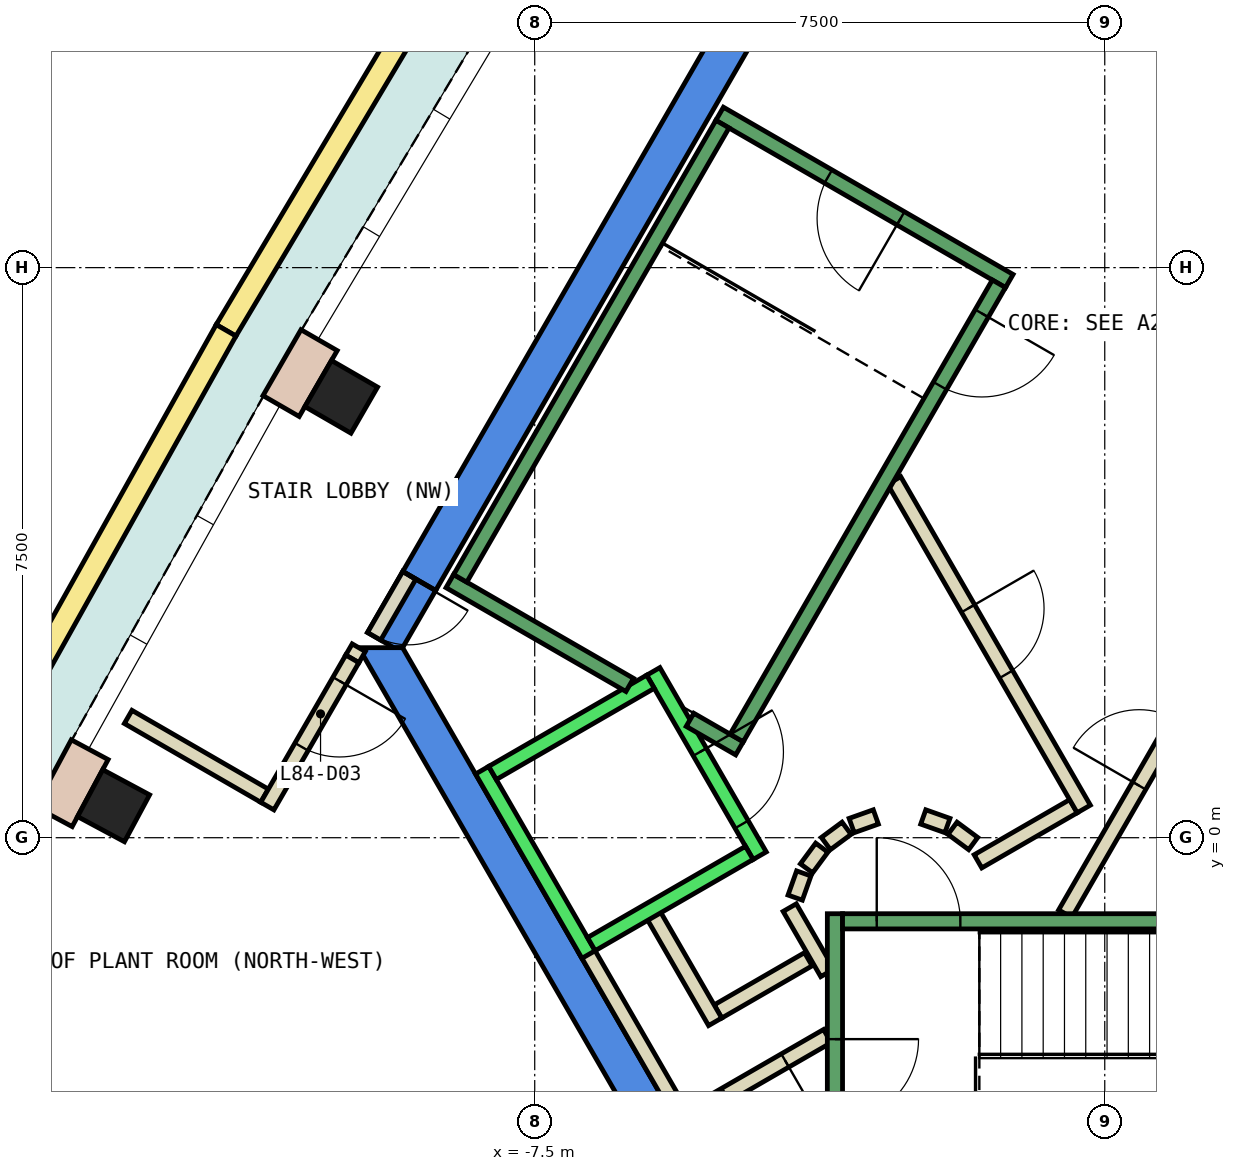
"""IFC4 building model, lengths in metres.
Left out: names, types, materials, properties, quantities, classifications, styles, units other than length and angle.
Written with IfcOpenShell. Run it as: python <this file> out.ifc"""

import sys

from ifc_helpers import new_model, si_unit, direction, frame, frame_2d, origin, origin_2d, place, context, subcontext, project, spatial, polyline, rectangle, outline, extrude, element, fill, save


model = new_model("IFC4")
c1 = context("Model", 3, precision=1e-05, world=origin(), true_north=direction((0.0, 1.0)))
c2 = subcontext(c1, "Body", "Model", "MODEL_VIEW")
j1 = project(units=[si_unit("LENGTHUNIT", "METRE"), si_unit("PLANEANGLEUNIT", "RADIAN")], contexts=[c1])
p1 = place(None, origin())
s1 = spatial("IfcSite", under=j1, at=p1, CompositionType="ELEMENT")
p2 = place(p1, origin())
s2 = spatial("IfcBuilding", under=s1, at=p2, CompositionType="ELEMENT")
p3 = place(p2, frame((0.0, 0.0, 358.4)))
s3 = spatial("IfcBuildingStorey", under=s2, at=p3, CompositionType="ELEMENT", Elevation=358.4)
for number, where, z_axis, x_axis in (
    (1, (-10.046, 5.8, 0.0), (0.0, 0.0, 1.0), (0.5, 0.866, 0.0)),
    (2, (-13.041, 0.421, 0.0), (0.0, 0.0, 1.0), (0.473, 0.881, 0.0)),
):
    element("IfcColumn", number, at=place(p3, frame(where, z_axis=z_axis, x_axis=x_axis)), inside=s3, PredefinedType="COLUMN", context=c2, shape_type="SweptSolid", body=[
        extrude(rectangle(XDim=0.7, YDim=0.7, at=origin_2d()), origin(), (0.0, 0.0, 1.0), 4.05),
    ])
p4 = place(p3, frame((0.0, 0.0, -0.45)))
e3 = element("IfcWall", 3, at=p4, inside=s3, PredefinedType="SHEAR", context=c2, shape_type="SweptSolid", body=[
    extrude(outline(polyline([(-9.236, 3.502), (-8.803, 3.253), (-4.619, 10.5), (-4.907, 11.0), (-9.236, 3.502)])), origin(), (0.0, 0.0, 1.0), 4.5),
])
p5 = place(p3, frame((0.0, 0.0, 3.6)))
e4 = element("IfcWall", 4, at=p5, inside=s3, PredefinedType="SHEAR", context=c2, shape_type="SweptSolid", body=[
    extrude(outline(polyline([(-9.7, 2.7), (-9.354, 2.5), (-9.238, 2.5), (-8.803, 3.253), (-9.236, 3.502), (-9.7, 2.7)])), origin(), (0.0, 0.0, 1.0), 0.45),
])
p6 = place(p3, frame((0.0, 0.0, -0.45)))
e5 = element("IfcWall", 5, at=p6, inside=s3, PredefinedType="SHEAR", context=c2, shape_type="SweptSolid", body=[
    extrude(outline(polyline([(-9.815, 2.5), (-4.907, -6.0), (-4.619, -5.5), (-9.238, 2.5), (-9.815, 2.5)])), origin(), (0.0, 0.0, 1.0), 4.5),
])
for number, where, z_axis, x_axis in (
    (6, (-10.337, 6.546, 0.0), (0.0, 0.0, 1.0), (-0.5, -0.866, 0.0)),
    (7, (-13.355, 1.158, 0.0), (0.0, 0.0, 1.0), (-0.472, -0.881, 0.0)),
):
    element("IfcWall", number, at=place(p3, frame(where, z_axis=z_axis, x_axis=x_axis)), inside=s3, PredefinedType="STANDARD", context=c2, shape_type="SweptSolid", body=[
        extrude(rectangle(XDim=1.001, YDim=0.55, at=frame_2d((0.5, 0.0))), origin(), (0.0, 0.0, 1.0), 4.05),
    ])
p7 = place(p3, origin())
e8 = element("IfcWall", 8, at=p7, inside=s3, PredefinedType="PARAPET", context=c2, shape_type="SweptSolid", body=[
    extrude(outline(polyline([(-8.278, 12.473), (-11.691, 6.75), (-11.431, 6.6), (-8.023, 12.316), (-8.278, 12.473)])), origin(), (0.0, 0.0, 1.0), 1.1),
])
p8 = place(p3, origin())
e9 = element("IfcWall", 9, at=p8, inside=s3, PredefinedType="PARAPET", context=c2, shape_type="SweptSolid", body=[
    extrude(outline(polyline([(-11.691, 6.75), (-14.941, 0.933), (-14.677, 0.79), (-11.431, 6.6), (-11.691, 6.75)])), origin(), (0.0, 0.0, 1.0), 1.1),
])
p9 = place(p3, frame((-3.9, -1.599, 0.0), z_axis=(0.0, 0.0, 1.0), x_axis=(-0.865969445389, -0.500096910261, 0.0)))
e10 = element("IfcWall", 10, at=p9, inside=s3, PredefinedType="PARTITIONING", context=c2, shape_type="SweptSolid", body=[
    extrude(rectangle(XDim=1.373, YDim=0.2, at=frame_2d((0.687, 0.0))), origin(), (0.0, 0.0, 1.0), 4.05),
])
p10 = place(p3, frame((-5.126, -2.422, 0.0), z_axis=(0.0, 0.0, 1.0), x_axis=(-0.500062241894, 0.865989465428, 0.0)))
e11 = element("IfcWall", 11, at=p10, inside=s3, PredefinedType="PARTITIONING", context=c2, shape_type="SweptSolid", body=[
    extrude(rectangle(XDim=1.7, YDim=0.2, at=frame_2d((0.85, 0.0))), origin(), (0.0, 0.0, 1.0), 4.05),
])
p11 = place(p3, frame((-5.492, -3.788, 0.0), z_axis=(0.0, 0.0, 1.0), x_axis=(-0.500008949224, 0.866020236886, 0.0)))
e12 = element("IfcWall", 12, at=p11, inside=s3, PredefinedType="PARTITIONING", context=c2, shape_type="SweptSolid", body=[
    extrude(rectangle(XDim=2.68, YDim=0.2, at=frame_2d((1.34, 0.0))), origin(), (0.0, 0.0, 1.0), 4.05),
])
p12 = place(p3, frame((-4.145, -0.92, 0.0), z_axis=(0.0, 0.0, 1.0), x_axis=(0.499743786207, -0.866173278362, 0.0)))
e13 = element("IfcWall", 13, at=p12, inside=s3, PredefinedType="PARTITIONING", context=c2, shape_type="SweptSolid", body=[
    extrude(rectangle(XDim=0.991, YDim=0.2, at=frame_2d((0.495, 0.0))), origin(), (0.0, 0.0, 1.0), 4.05),
])
p13 = place(p3, frame((-3.65, -2.61, 0.0), z_axis=(0.0, 0.0, 1.0), x_axis=(-0.866072462134, -0.499918483688, 0.0)))
e14 = element("IfcWall", 14, at=p13, inside=s3, PredefinedType="PARTITIONING", context=c2, shape_type="SweptSolid", body=[
    extrude(rectangle(XDim=2.084, YDim=0.2, at=frame_2d((1.042, 0.0))), origin(), (0.0, 0.0, 1.0), 4.05),
])
p14 = place(p13, frame((0.642, 0.0, 0.0)))
e15 = element("IfcOpeningElement", 15, at=p14, cuts=e14, PredefinedType="OPENING", context=c2, shape_type="SweptSolid", body=[
    extrude(rectangle(XDim=0.9, YDim=2.1, at=frame_2d((0.45, 1.05))), frame((0.0, 0.11, 0.0), z_axis=(0.0, -1.0, 0.0), x_axis=(1.0, 0.0, 0.0)), (0.0, 0.0, 1.0), 0.22),
])
p15 = place(p3, frame((-0.52, -1.0, 0.0), z_axis=(0.0, 0.0, 1.0), x_axis=(0.50011622646, 0.865958290007, 0.0)))
e16 = element("IfcWall", 16, at=p15, inside=s3, PredefinedType="PARTITIONING", context=c2, shape_type="SweptSolid", body=[
    extrude(rectangle(XDim=4.991, YDim=0.2, at=frame_2d((2.496, 0.0))), origin(), (0.0, 0.0, 1.0), 4.05),
])
p16 = place(p15, frame((1.945, 0.0, 0.0)))
e17 = element("IfcOpeningElement", 17, at=p16, cuts=e16, PredefinedType="OPENING", context=c2, shape_type="SweptSolid", body=[
    extrude(rectangle(XDim=1.0, YDim=2.1, at=frame_2d((0.5, 1.05))), frame((0.0, 0.11, 0.0), z_axis=(0.0, -1.0, 0.0), x_axis=(1.0, 0.0, 0.0)), (0.0, 0.0, 1.0), 0.22),
])
p17 = place(p3, frame((-0.412, 0.414, 0.0), z_axis=(0.0, 0.0, 1.0), x_axis=(-0.866017369001, -0.500013916395, 0.0)))
e18 = element("IfcWall", 18, at=p17, inside=s3, PredefinedType="PARTITIONING", context=c2, shape_type="SweptSolid", body=[
    extrude(rectangle(XDim=1.45, YDim=0.2, at=frame_2d((0.725, 0.0))), origin(), (0.0, 0.0, 1.0), 4.05),
])
p18 = place(p3, frame((-1.731, -0.077, 0.0), z_axis=(0.0, 0.0, 1.0), x_axis=(-0.804311165252, 0.594208338422, 0.0)))
e19 = element("IfcWall", 19, at=p18, inside=s3, PredefinedType="PARTITIONING", context=c2, shape_type="SweptSolid", body=[
    extrude(rectangle(XDim=0.338, YDim=0.2, at=frame_2d((0.169, 0.0))), origin(), (0.0, 0.0, 1.0), 4.05),
])
p19 = place(p3, frame((-2.07, 0.16, 0.0), z_axis=(0.0, 0.0, 1.0), x_axis=(-0.942199461132, 0.335052496547, 0.0)))
e20 = element("IfcWall", 20, at=p19, inside=s3, PredefinedType="PARTITIONING", context=c2, shape_type="SweptSolid", body=[
    extrude(rectangle(XDim=0.337, YDim=0.2, at=frame_2d((0.169, 0.0))), origin(), (0.0, 0.0, 1.0), 4.05),
])
p20 = place(p3, frame((-3.012, 0.273, 0.0), z_axis=(0.0, 0.0, 1.0), x_axis=(-0.942280615813, -0.334824194261, 0.0)))
e21 = element("IfcWall", 21, at=p20, inside=s3, PredefinedType="PARTITIONING", context=c2, shape_type="SweptSolid", body=[
    extrude(rectangle(XDim=0.338, YDim=0.2, at=frame_2d((0.169, 0.0))), origin(), (0.0, 0.0, 1.0), 4.05),
])
p21 = place(p3, frame((-3.397, 0.124, 0.0), z_axis=(0.0, 0.0, 1.0), x_axis=(-0.804311165252, -0.594208338422, 0.0)))
e22 = element("IfcWall", 22, at=p21, inside=s3, PredefinedType="PARTITIONING", context=c2, shape_type="SweptSolid", body=[
    extrude(rectangle(XDim=0.338, YDim=0.2, at=frame_2d((0.169, 0.0))), origin(), (0.0, 0.0, 1.0), 4.05),
])
p22 = place(p3, frame((-3.723, -0.131, 0.0), z_axis=(0.0, 0.0, 1.0), x_axis=(-0.594675113454, -0.803966112121, 0.0)))
e23 = element("IfcWall", 23, at=p22, inside=s3, PredefinedType="PARTITIONING", context=c2, shape_type="SweptSolid", body=[
    extrude(rectangle(XDim=0.338, YDim=0.2, at=frame_2d((0.169, 0.0))), origin(), (0.0, 0.0, 1.0), 4.05),
])
p23 = place(p3, frame((-3.96, -0.47, 0.0), z_axis=(0.0, 0.0, 1.0), x_axis=(-0.334824194261, -0.942280615813, 0.0)))
e24 = element("IfcWall", 24, at=p23, inside=s3, PredefinedType="PARTITIONING", context=c2, shape_type="SweptSolid", body=[
    extrude(rectangle(XDim=0.338, YDim=0.2, at=frame_2d((0.169, 0.0))), origin(), (0.0, 0.0, 1.0), 4.05),
])
p24 = place(p3, frame((-2.771, 4.7, 0.0), z_axis=(0.0, 0.0, 1.0), x_axis=(0.499969479948, -0.866043023828, 0.0)))
e25 = element("IfcWall", 25, at=p24, inside=s3, PredefinedType="PARTITIONING", context=c2, shape_type="SweptSolid", body=[
    extrude(rectangle(XDim=4.99, YDim=0.2, at=frame_2d((2.495, 0.0))), origin(), (0.0, 0.0, 1.0), 4.05),
])
p25 = place(p24, frame((1.945, 0.0, 0.0)))
e26 = element("IfcOpeningElement", 26, at=p25, cuts=e25, PredefinedType="OPENING", context=c2, shape_type="SweptSolid", body=[
    extrude(rectangle(XDim=1.0, YDim=2.1, at=frame_2d((0.5, 1.05))), frame((0.0, 0.11, 0.0), z_axis=(0.0, -1.0, 0.0), x_axis=(1.0, 0.0, 0.0)), (0.0, 0.0, 1.0), 0.22),
])
p26 = place(p3, frame((-11.055, 0.553, 0.0), z_axis=(0.0, 0.0, 1.0), x_axis=(-0.865971676864, 0.500093046212, 0.0)))
e27 = element("IfcWall", 27, at=p26, inside=s3, PredefinedType="PARTITIONING", context=c2, shape_type="SweptSolid", body=[
    extrude(rectangle(XDim=2.072, YDim=0.2, at=frame_2d((1.036, 0.0))), origin(), (0.0, 0.0, 1.0), 4.05),
])
p27 = place(p3, frame((-9.815, 2.5, 0.0), z_axis=(0.0, 0.0, 1.0), x_axis=(-0.5004692653, -0.865754303766, 0.0)))
e28 = element("IfcWall", 28, at=p27, inside=s3, PredefinedType="PARTITIONING", context=c2, shape_type="SweptSolid", body=[
    extrude(rectangle(XDim=0.17, YDim=0.2, at=frame_2d((0.085, 0.0))), origin(), (0.0, 0.0, 1.0), 2.4),
])
p28 = place(p3, frame((-9.15, 3.452, 0.0), z_axis=(0.0, 0.0, 1.0), x_axis=(-0.500079945886, -0.865979242085, 0.0)))
e29 = element("IfcWall", 29, at=p28, inside=s3, PredefinedType="PARTITIONING", context=c2, shape_type="SweptSolid", body=[
    extrude(rectangle(XDim=0.926, YDim=0.2, at=frame_2d((0.463, 0.0))), origin(), (0.0, 0.0, 1.0), 2.4),
])
p29 = place(p28, frame((0.017, 0.0, 0.0)))
e30 = element("IfcOpeningElement", 30, at=p29, cuts=e29, PredefinedType="OPENING", context=c2, shape_type="SweptSolid", body=[
    extrude(rectangle(XDim=0.9, YDim=2.1, at=frame_2d((0.45, 1.05))), frame((0.0, 0.11, 0.0), z_axis=(0.0, -1.0, 0.0), x_axis=(1.0, 0.0, 0.0)), (0.0, 0.0, 1.0), 0.22),
])
p30 = place(p3, frame((-9.9, 2.353, 0.0), z_axis=(0.0, 0.0, 1.0), x_axis=(-0.499942933724, -0.866058348508, 0.0)))
e31 = element("IfcWall", 31, at=p30, inside=s3, PredefinedType="PARTITIONING", context=c2, shape_type="SweptSolid", body=[
    extrude(rectangle(XDim=2.237, YDim=0.2, at=frame_2d((1.118, 0.0))), origin(), (0.0, 0.0, 1.0), 4.05),
])
p31 = place(p30, frame((0.336, 0.0, 0.0)))
e32 = element("IfcOpeningElement", 32, at=p31, cuts=e31, PredefinedType="OPENING", context=c2, shape_type="SweptSolid", body=[
    extrude(rectangle(XDim=1.0, YDim=2.1, at=frame_2d((0.5, 1.05))), frame((0.0, 0.11, 0.0), z_axis=(0.0, -1.0, 0.0), x_axis=(1.0, 0.0, 0.0)), (0.0, 0.0, 1.0), 0.22),
])
p32 = place(p3, frame((-5.94, 2.188, 0.0), z_axis=(0.0, 0.0, 1.0), x_axis=(0.49994636267, -0.866056369097, 0.0)))
e33 = element("IfcWall", 33, at=p32, inside=s3, PredefinedType="STANDARD", context=c2, shape_type="SweptSolid", body=[
    extrude(rectangle(XDim=2.8, YDim=0.2, at=frame_2d((1.4, 0.0))), origin(), (0.0, 0.0, 1.0), 4.05),
])
p33 = place(p32, frame((1.225, 0.0, 0.0)))
e34 = element("IfcOpeningElement", 34, at=p33, cuts=e33, PredefinedType="OPENING", context=c2, shape_type="SweptSolid", body=[
    extrude(rectangle(XDim=1.1, YDim=2.1, at=frame_2d((0.55, 1.05))), frame((0.0, 0.11, 0.0), z_axis=(0.0, -1.0, 0.0), x_axis=(1.0, 0.0, 0.0)), (0.0, 0.0, 1.0), 0.22),
])
p34 = place(p3, frame((-8.192, 0.888, 0.0), z_axis=(0.0, 0.0, 1.0), x_axis=(0.49994636267, -0.866056369097, 0.0)))
e35 = element("IfcWall", 35, at=p34, inside=s3, PredefinedType="STANDARD", context=c2, shape_type="SweptSolid", body=[
    extrude(rectangle(XDim=2.8, YDim=0.2, at=frame_2d((1.4, 0.0))), origin(), (0.0, 0.0, 1.0), 4.05),
])
for number, where, z_axis, x_axis in (
    (36, (-5.977, 2.052, 0.0), (0.0, 0.0, 1.0), (-0.866, -0.5, 0.0)),
    (37, (-4.677, -0.2, 0.0), (0.0, 0.0, 1.0), (-0.866, -0.5, 0.0)),
):
    element("IfcWall", number, at=place(p3, frame(where, z_axis=z_axis, x_axis=x_axis)), inside=s3, PredefinedType="STANDARD", context=c2, shape_type="SweptSolid", body=[
        extrude(rectangle(XDim=2.399, YDim=0.2, at=frame_2d((1.2, 0.0))), origin(), (0.0, 0.0, 1.0), 4.05),
    ])
p35 = place(p3, frame((-3.55, -1.0, 0.0), z_axis=(0.0, 0.0, 1.0), x_axis=(0.0, -1.0, 0.0)))
e38 = element("IfcWall", 38, at=p35, inside=s3, PredefinedType="STANDARD", context=c2, shape_type="SweptSolid", body=[
    extrude(rectangle(XDim=4.4, YDim=0.2, at=frame_2d((2.2, 0.0))), origin(), (0.0, 0.0, 1.0), 4.05),
])
p36 = place(p35, frame((1.65, 0.0, 0.0)))
e39 = element("IfcOpeningElement", 39, at=p36, cuts=e38, PredefinedType="OPENING", context=c2, shape_type="SweptSolid", body=[
    extrude(rectangle(XDim=1.1, YDim=2.2, at=frame_2d((0.55, 1.1))), frame((0.0, 0.11, 0.0), z_axis=(0.0, -1.0, 0.0), x_axis=(1.0, 0.0, 0.0)), (0.0, 0.0, 1.0), 0.22),
])
p37 = place(p3, frame((-3.45, -1.1, 0.0), z_axis=(0.0, 0.0, 1.0), x_axis=(1.0, 0.0, 0.0)))
e40 = element("IfcWall", 40, at=p37, inside=s3, PredefinedType="STANDARD", context=c2, shape_type="SweptSolid", body=[
    extrude(rectangle(XDim=6.9, YDim=0.2, at=frame_2d((3.45, 0.0))), origin(), (0.0, 0.0, 1.0), 4.05),
])
p38 = place(p37, frame((0.45, 0.0, 0.0)))
e41 = element("IfcOpeningElement", 41, at=p38, cuts=e40, PredefinedType="OPENING", context=c2, shape_type="SweptSolid", body=[
    extrude(rectangle(XDim=1.1, YDim=2.2, at=frame_2d((0.55, 1.1))), frame((0.0, 0.11, 0.0), z_axis=(0.0, -1.0, 0.0), x_axis=(1.0, 0.0, 0.0)), (0.0, 0.0, 1.0), 0.22),
])
p39 = place(p3, frame((-1.256, 7.324, 0.0), z_axis=(0.0, 0.0, 1.0), x_axis=(-0.866046073146, 0.499964197906, 0.0)))
e42 = element("IfcWall", 42, at=p39, inside=s3, PredefinedType="STANDARD", context=c2, shape_type="SweptSolid", body=[
    extrude(rectangle(XDim=4.4, YDim=0.2, at=frame_2d((2.2, 0.0))), origin(), (0.0, 0.0, 1.0), 4.05),
])
p40 = place(p39, frame((1.65, 0.0, 0.0)))
e43 = element("IfcOpeningElement", 43, at=p40, cuts=e42, PredefinedType="OPENING", context=c2, shape_type="SweptSolid", body=[
    extrude(rectangle(XDim=1.1, YDim=2.2, at=frame_2d((0.55, 1.1))), frame((0.0, 0.11, 0.0), z_axis=(0.0, -1.0, 0.0), x_axis=(1.0, 0.0, 0.0)), (0.0, 0.0, 1.0), 0.22),
])
p41 = place(p3, frame((-6.25, 2.01, 0.0), z_axis=(0.0, 0.0, 1.0), x_axis=(-0.86611865017, 0.499838457731, 0.0)))
e44 = element("IfcWall", 44, at=p41, inside=s3, PredefinedType="STANDARD", context=c2, shape_type="SweptSolid", body=[
    extrude(rectangle(XDim=2.733, YDim=0.2, at=frame_2d((1.366, 0.0))), origin(), (0.0, 0.0, 1.0), 4.05),
])
p42 = place(p3, frame((-4.806, 1.176, 0.0), z_axis=(0.0, 0.0, 1.0), x_axis=(-0.866558586415, 0.499075361355, 0.0)))
e45 = element("IfcWall", 45, at=p42, inside=s3, PredefinedType="STANDARD", context=c2, shape_type="SweptSolid", body=[
    extrude(rectangle(XDim=0.751, YDim=0.2, at=frame_2d((0.376, 0.0))), origin(), (0.0, 0.0, 1.0), 4.05),
])
p43 = place(p3, frame((-1.393, 7.288, 0.0), z_axis=(0.0, 0.0, 1.0), x_axis=(-0.499963383562, -0.866046543262, 0.0)))
e46 = element("IfcWall", 46, at=p43, inside=s3, PredefinedType="STANDARD", context=c2, shape_type="SweptSolid", body=[
    extrude(rectangle(XDim=6.9, YDim=0.2, at=frame_2d((3.45, 0.0))), origin(), (0.0, 0.0, 1.0), 4.05),
])
p44 = place(p43, frame((0.45, 0.0, 0.0)))
e47 = element("IfcOpeningElement", 47, at=p44, cuts=e46, PredefinedType="OPENING", context=c2, shape_type="SweptSolid", body=[
    extrude(rectangle(XDim=1.1, YDim=2.2, at=frame_2d((0.55, 1.1))), frame((0.0, 0.11, 0.0), z_axis=(0.0, -1.0, 0.0), x_axis=(1.0, 0.0, 0.0)), (0.0, 0.0, 1.0), 0.22),
])
p45 = place(p3, frame((-5.03, 9.388, 0.0), z_axis=(0.0, 0.0, 1.0), x_axis=(-0.499978703459, -0.866037698999, 0.0)))
e48 = element("IfcWall", 48, at=p45, inside=s3, PredefinedType="STANDARD", context=c2, shape_type="SweptSolid", body=[
    extrude(rectangle(XDim=6.9, YDim=0.2, at=frame_2d((3.45, 0.0))), origin(), (0.0, 0.0, 1.0), 4.05),
])
p46 = place(p31, origin())
e49 = element("IfcDoor", 49, at=p46, inside=s3, OperationType="SINGLE_SWING_LEFT", PredefinedType="DOOR", context=c2, shape_type="SweptSolid", body=[
    extrude(rectangle(XDim=1.0, YDim=2.1, at=frame_2d((0.5, 1.05))), frame((0.0, 0.025, 0.0), z_axis=(0.0, -1.0, 0.0), x_axis=(1.0, 0.0, 0.0)), (0.0, 0.0, 1.0), 0.05),
])
fill(e32, e49)
p47 = place(p16, origin())
e50 = element("IfcDoor", 50, at=p47, inside=s3, OperationType="SINGLE_SWING_LEFT", PredefinedType="DOOR", context=c2, shape_type="SweptSolid", body=[
    extrude(rectangle(XDim=1.0, YDim=2.1, at=frame_2d((0.5, 1.05))), frame((0.0, 0.025, 0.0), z_axis=(0.0, -1.0, 0.0), x_axis=(1.0, 0.0, 0.0)), (0.0, 0.0, 1.0), 0.05),
])
fill(e17, e50)
p48 = place(p25, origin())
e51 = element("IfcDoor", 51, at=p48, inside=s3, OperationType="SINGLE_SWING_RIGHT", PredefinedType="DOOR", context=c2, shape_type="SweptSolid", body=[
    extrude(rectangle(XDim=1.0, YDim=2.1, at=frame_2d((0.5, 1.05))), frame((0.0, 0.025, 0.0), z_axis=(0.0, -1.0, 0.0), x_axis=(1.0, 0.0, 0.0)), (0.0, 0.0, 1.0), 0.05),
])
fill(e26, e51)
p49 = place(p14, origin())
e52 = element("IfcDoor", 52, at=p49, inside=s3, OperationType="SINGLE_SWING_LEFT", PredefinedType="DOOR", context=c2, shape_type="SweptSolid", body=[
    extrude(rectangle(XDim=0.9, YDim=2.1, at=frame_2d((0.45, 1.05))), frame((0.0, 0.025, 0.0), z_axis=(0.0, -1.0, 0.0), x_axis=(1.0, 0.0, 0.0)), (0.0, 0.0, 1.0), 0.05),
])
fill(e15, e52)
p50 = place(p29, origin())
e53 = element("IfcDoor", 53, at=p50, inside=s3, OperationType="SINGLE_SWING_LEFT", PredefinedType="DOOR", context=c2, shape_type="SweptSolid", body=[
    extrude(rectangle(XDim=0.9, YDim=2.1, at=frame_2d((0.45, 1.05))), frame((0.0, 0.025, 0.0), z_axis=(0.0, -1.0, 0.0), x_axis=(1.0, 0.0, 0.0)), (0.0, 0.0, 1.0), 0.05),
])
fill(e30, e53)
p51 = place(p33, origin())
e54 = element("IfcDoor", 54, at=p51, inside=s3, OperationType="SLIDING_TO_LEFT", PredefinedType="DOOR", context=c2, shape_type="SweptSolid", body=[
    extrude(rectangle(XDim=1.1, YDim=2.1, at=frame_2d((0.55, 1.05))), frame((0.0, 0.025, 0.0), z_axis=(0.0, -1.0, 0.0), x_axis=(1.0, 0.0, 0.0)), (0.0, 0.0, 1.0), 0.05),
])
fill(e34, e54)
p52 = place(p38, origin())
e55 = element("IfcDoor", 55, at=p52, inside=s3, OperationType="SINGLE_SWING_LEFT", PredefinedType="DOOR", context=c2, shape_type="SweptSolid", body=[
    extrude(rectangle(XDim=1.1, YDim=2.2, at=frame_2d((0.55, 1.1))), frame((0.0, 0.025, 0.0), z_axis=(0.0, -1.0, 0.0), x_axis=(1.0, 0.0, 0.0)), (0.0, 0.0, 1.0), 0.05),
])
fill(e41, e55)
p53 = place(p36, origin())
e56 = element("IfcDoor", 56, at=p53, inside=s3, OperationType="SINGLE_SWING_LEFT", PredefinedType="DOOR", context=c2, shape_type="SweptSolid", body=[
    extrude(rectangle(XDim=1.1, YDim=2.2, at=frame_2d((0.55, 1.1))), frame((0.0, 0.025, 0.0), z_axis=(0.0, -1.0, 0.0), x_axis=(1.0, 0.0, 0.0)), (0.0, 0.0, 1.0), 0.05),
])
fill(e39, e56)
p54 = place(p44, origin())
e57 = element("IfcDoor", 57, at=p54, inside=s3, OperationType="SINGLE_SWING_LEFT", PredefinedType="DOOR", context=c2, shape_type="SweptSolid", body=[
    extrude(rectangle(XDim=1.1, YDim=2.2, at=frame_2d((0.55, 1.1))), frame((0.0, 0.025, 0.0), z_axis=(0.0, -1.0, 0.0), x_axis=(1.0, 0.0, 0.0)), (0.0, 0.0, 1.0), 0.05),
])
fill(e47, e57)
p55 = place(p40, origin())
e58 = element("IfcDoor", 58, at=p55, inside=s3, OperationType="SINGLE_SWING_LEFT", PredefinedType="DOOR", context=c2, shape_type="SweptSolid", body=[
    extrude(rectangle(XDim=1.1, YDim=2.2, at=frame_2d((0.55, 1.1))), frame((0.0, 0.025, 0.0), z_axis=(0.0, -1.0, 0.0), x_axis=(1.0, 0.0, 0.0)), (0.0, 0.0, 1.0), 0.05),
])
fill(e43, e58)
save(model, sys.argv[1])
